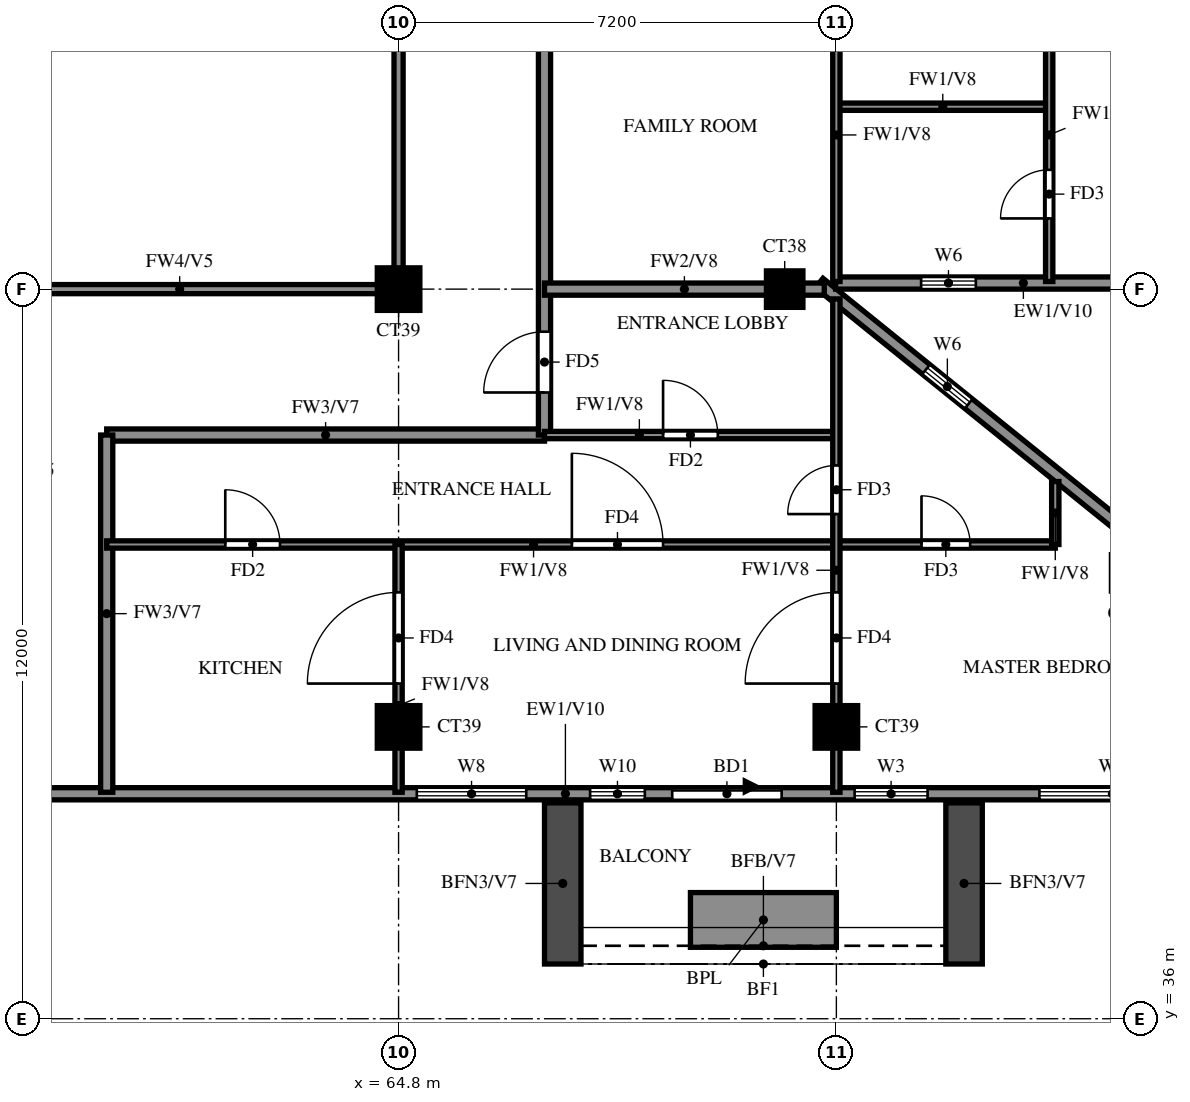
"""IFC4 building model, lengths in metres.
Left out: names, types, materials, properties, quantities, classifications, styles, units other than length and angle.
Written with IfcOpenShell. Run it as: python <this file> out.ifc"""

import sys

from ifc_helpers import new_model, si_unit, direction, frame, frame_2d, origin, origin_2d, place, context, subcontext, project, spatial, rectangle, extrude, source, transform, mapped, element, fill, save


model = new_model("IFC4")
c1 = context("Model", 3, precision=1e-05, world=origin(), true_north=direction((0.0, 1.0)))
c2 = subcontext(c1, "Body", "Model", "MODEL_VIEW")
j1 = project(units=[si_unit("LENGTHUNIT", "METRE"), si_unit("PLANEANGLEUNIT", "RADIAN")], contexts=[c1])
p1 = place(None, origin())
s1 = spatial("IfcSite", under=j1, at=p1, CompositionType="ELEMENT")
p2 = place(p1, origin())
s2 = spatial("IfcBuilding", under=s1, at=p2, CompositionType="ELEMENT")
p3 = place(p2, frame((0.0, 0.0, 267.5)))
s3 = spatial("IfcBuildingStorey", under=s2, at=p3, CompositionType="ELEMENT", Elevation=267.5)
m1 = source(origin(), c2, "Body", "SweptSolid", [
    extrude(rectangle(XDim=0.7, YDim=0.7, at=origin_2d()), origin(), (0.0, 0.0, 1.0), 3.099),
])
for number, where, z_axis, x_axis in (
    (1, (64.8, 40.8, 0.0), (0.0, 0.0, 1.0), (1.0, 0.0, 0.0)),
    (2, (72.0, 40.8, 0.0), (0.0, 0.0, 1.0), (1.0, 0.0, 0.0)),
    (3, (64.8, 48.0, 0.0), (0.0, 0.0, 1.0), (1.0, 0.0, 0.0)),
):
    element("IfcColumn", number, at=place(p3, frame(where, z_axis=z_axis, x_axis=x_axis)), inside=s3, PredefinedType="COLUMN", context=c2, shape_type="MappedRepresentation", body=[
        mapped(m1, transform((0.0, 0.0, 0.0))),
    ])
m2 = source(origin(), c2, "Body", "SweptSolid", [
    extrude(rectangle(XDim=0.6, YDim=0.6, at=origin_2d()), origin(), (0.0, 0.0, 1.0), 3.099),
])
p4 = place(p3, frame((71.15, 48.0, 0.0), z_axis=(0.0, 0.0, 1.0), x_axis=(1.0, 0.0, 0.0)))
e4 = element("IfcColumn", 4, at=p4, inside=s3, PredefinedType="COLUMN", context=c2, shape_type="MappedRepresentation", body=[
    mapped(m2, transform((0.0, 0.0, 0.0))),
])
p5 = place(p3, frame((81.907, 39.87, 0.0), z_axis=(0.0, 0.0, 1.0), x_axis=(-0.777936274417, 0.62834318087, 0.0)))
e5 = element("IfcWall", 5, at=p5, inside=s3, PredefinedType="SOLIDWALL", context=c2, shape_type="SweptSolid", body=[
    extrude(rectangle(XDim=13.099, YDim=0.2, at=frame_2d((6.549, 0.0))), origin(), (0.0, 0.0, 1.0), 3.099),
])
p6 = place(p5, frame((9.938, 0.0, 1.5)))
e6 = element("IfcOpeningElement", 6, at=p6, cuts=e5, PredefinedType="OPENING", context=c2, shape_type="SweptSolid", body=[
    extrude(rectangle(XDim=0.9, YDim=0.9, at=frame_2d((0.45, 0.45))), frame((0.0, 0.11, 0.0), z_axis=(0.0, -1.0, 0.0), x_axis=(1.0, 0.0, 0.0)), (0.0, 0.0, 1.0), 0.22),
])
p7 = place(p3, frame((71.987, 48.1, 0.0), z_axis=(0.0, 0.0, 1.0), x_axis=(1.0, 0.0, 0.0)))
e7 = element("IfcWall", 7, at=p7, inside=s3, PredefinedType="SOLIDWALL", context=c2, shape_type="SweptSolid", body=[
    extrude(rectangle(XDim=6.863, YDim=0.2, at=frame_2d((3.432, 0.0))), origin(), (0.0, 0.0, 1.0), 3.099),
])
p8 = place(p7, frame((1.406, 0.0, 1.5)))
e8 = element("IfcOpeningElement", 8, at=p8, cuts=e7, PredefinedType="OPENING", context=c2, shape_type="SweptSolid", body=[
    extrude(rectangle(XDim=0.9, YDim=0.9, at=frame_2d((0.45, 0.45))), frame((0.0, 0.11, 0.0), z_axis=(0.0, -1.0, 0.0), x_axis=(1.0, 0.0, 0.0)), (0.0, 0.0, 1.0), 0.22),
])
p9 = place(p3, frame((58.8, 39.7, 0.0), z_axis=(0.0, 0.0, 1.0), x_axis=(1.0, 0.0, 0.0)))
e9 = element("IfcWall", 9, at=p9, inside=s3, PredefinedType="SOLIDWALL", context=c2, shape_type="SweptSolid", body=[
    extrude(rectangle(XDim=23.317, YDim=0.2, at=frame_2d((11.658, 0.0))), origin(), (0.0, 0.0, 1.0), 3.099),
])
p10 = place(p9, frame((10.5, 0.0, 0.0)))
e10 = element("IfcOpeningElement", 10, at=p10, cuts=e9, PredefinedType="OPENING", context=c2, shape_type="SweptSolid", body=[
    extrude(rectangle(XDim=1.8, YDim=2.4, at=frame_2d((0.9, 1.2))), frame((0.0, 0.11, 0.0), z_axis=(0.0, -1.0, 0.0), x_axis=(1.0, 0.0, 0.0)), (0.0, 0.0, 1.0), 0.22),
])
p11 = place(p9, frame((6.3, 0.0, 0.6)))
e11 = element("IfcOpeningElement", 11, at=p11, cuts=e9, PredefinedType="OPENING", context=c2, shape_type="SweptSolid", body=[
    extrude(rectangle(XDim=1.8, YDim=2.4, at=frame_2d((0.9, 1.2))), frame((0.0, 0.11, 0.0), z_axis=(0.0, -1.0, 0.0), x_axis=(1.0, 0.0, 0.0)), (0.0, 0.0, 1.0), 0.22),
])
p12 = place(p9, frame((9.15, 0.0, 0.6)))
e12 = element("IfcOpeningElement", 12, at=p12, cuts=e9, PredefinedType="OPENING", context=c2, shape_type="SweptSolid", body=[
    extrude(rectangle(XDim=0.9, YDim=2.4, at=frame_2d((0.45, 1.2))), frame((0.0, 0.11, 0.0), z_axis=(0.0, -1.0, 0.0), x_axis=(1.0, 0.0, 0.0)), (0.0, 0.0, 1.0), 0.22),
])
p13 = place(p9, frame((13.5, 0.0, 0.6)))
e13 = element("IfcOpeningElement", 13, at=p13, cuts=e9, PredefinedType="OPENING", context=c2, shape_type="SweptSolid", body=[
    extrude(rectangle(XDim=1.2, YDim=2.4, at=frame_2d((0.6, 1.2))), frame((0.0, 0.11, 0.0), z_axis=(0.0, -1.0, 0.0), x_axis=(1.0, 0.0, 0.0)), (0.0, 0.0, 1.0), 0.22),
])
p14 = place(p9, frame((16.539, 0.0, 0.6)))
e14 = element("IfcOpeningElement", 14, at=p14, cuts=e9, PredefinedType="OPENING", context=c2, shape_type="SweptSolid", body=[
    extrude(rectangle(XDim=2.4, YDim=2.4, at=frame_2d((1.2, 1.2))), frame((0.0, 0.11, 0.0), z_axis=(0.0, -1.0, 0.0), x_axis=(1.0, 0.0, 0.0)), (0.0, 0.0, 1.0), 0.22),
])
p15 = place(p9, frame((19.778, 0.0, 0.6)))
e15 = element("IfcOpeningElement", 15, at=p15, cuts=e9, PredefinedType="OPENING", context=c2, shape_type="SweptSolid", body=[
    extrude(rectangle(XDim=2.4, YDim=2.4, at=frame_2d((1.2, 1.2))), frame((0.0, 0.11, 0.0), z_axis=(0.0, -1.0, 0.0), x_axis=(1.0, 0.0, 0.0)), (0.0, 0.0, 1.0), 0.22),
])
for number, where, z_axis, x_axis in (
    (16, (67.5, 39.55, 0.0), (0.0, 0.0, 1.0), (0.0, -1.0, 0.0)),
    (17, (74.1, 39.55, 0.0), (0.0, 0.0, 1.0), (0.0, -1.0, 0.0)),
):
    element("IfcWall", number, at=place(p3, frame(where, z_axis=z_axis, x_axis=x_axis)), inside=s3, PredefinedType="SOLIDWALL", context=c2, shape_type="SweptSolid", body=[
        extrude(rectangle(XDim=2.65, YDim=0.6, at=frame_2d((1.325, 0.0))), origin(), (0.0, 0.0, 1.0), 2.729),
    ])
p16 = place(p3, frame((69.6, 37.625, 0.0), z_axis=(0.0, 0.0, 1.0), x_axis=(1.0, 0.0, 0.0)))
e18 = element("IfcWall", 18, at=p16, inside=s3, PredefinedType="SOLIDWALL", context=c2, shape_type="SweptSolid", body=[
    extrude(rectangle(XDim=2.4, YDim=0.9, at=frame_2d((1.2, 0.0))), origin(), (0.0, 0.0, 1.0), 0.9),
])
p17 = place(p3, frame((60.0, 45.6, 0.0), z_axis=(0.0, 0.0, 1.0), x_axis=(1.0, 0.0, 0.0)))
e19 = element("IfcWall", 19, at=p17, inside=s3, PredefinedType="SOLIDWALL", context=c2, shape_type="SweptSolid", body=[
    extrude(rectangle(XDim=7.2, YDim=0.2, at=frame_2d((3.6, 0.0))), origin(), (0.0, 0.0, 1.0), 3.099),
])
p18 = place(p3, frame((60.0, 39.725, 0.0), z_axis=(0.0, 0.0, 1.0), x_axis=(0.0, 1.0, 0.0)))
e20 = element("IfcWall", 20, at=p18, inside=s3, PredefinedType="SOLIDWALL", context=c2, shape_type="SweptSolid", body=[
    extrude(rectangle(XDim=5.875, YDim=0.2, at=frame_2d((2.938, 0.0))), origin(), (0.0, 0.0, 1.0), 3.099),
])
p19 = place(p3, frame((67.2, 45.6, 0.0), z_axis=(0.0, 0.0, 1.0), x_axis=(0.0, 1.0, 0.0)))
e21 = element("IfcWall", 21, at=p19, inside=s3, PredefinedType="SOLIDWALL", context=c2, shape_type="SweptSolid", body=[
    extrude(rectangle(XDim=16.8, YDim=0.2, at=frame_2d((8.4, 0.0))), origin(), (0.0, 0.0, 1.0), 3.099),
])
p20 = place(p19, frame((8.3, 0.0, 0.0)))
e22 = element("IfcOpeningElement", 22, at=p20, cuts=e21, PredefinedType="OPENING", context=c2, shape_type="SweptSolid", body=[
    extrude(rectangle(XDim=1.0, YDim=2.1, at=frame_2d((0.5, 1.05))), frame((0.0, 0.11, 0.0), z_axis=(0.0, -1.0, 0.0), x_axis=(1.0, 0.0, 0.0)), (0.0, 0.0, 1.0), 0.22),
])
p21 = place(p19, frame((15.1, 0.0, 0.0)))
e23 = element("IfcOpeningElement", 23, at=p21, cuts=e21, PredefinedType="OPENING", context=c2, shape_type="SweptSolid", body=[
    extrude(rectangle(XDim=1.0, YDim=2.1, at=frame_2d((0.5, 1.05))), frame((0.0, 0.11, 0.0), z_axis=(0.0, -1.0, 0.0), x_axis=(1.0, 0.0, 0.0)), (0.0, 0.0, 1.0), 0.22),
])
p22 = place(p19, frame((0.7, 0.0, 0.0)))
e24 = element("IfcOpeningElement", 24, at=p22, cuts=e21, PredefinedType="OPENING", context=c2, shape_type="SweptSolid", body=[
    extrude(rectangle(XDim=1.0, YDim=2.1, at=frame_2d((0.5, 1.05))), frame((0.0, 0.11, 0.0), z_axis=(0.0, -1.0, 0.0), x_axis=(1.0, 0.0, 0.0)), (0.0, 0.0, 1.0), 0.22),
])
p23 = place(p3, frame((67.2, 48.0, 0.0), z_axis=(0.0, 0.0, 1.0), x_axis=(1.0, 0.0, 0.0)))
e25 = element("IfcWall", 25, at=p23, inside=s3, PredefinedType="SOLIDWALL", context=c2, shape_type="SweptSolid", body=[
    extrude(rectangle(XDim=4.601, YDim=0.2, at=frame_2d((2.301, 0.0))), origin(), (0.0, 0.0, 1.0), 3.099),
])
p24 = place(p3, frame((60.0, 43.8, 0.0), z_axis=(0.0, 0.0, 1.0), x_axis=(1.0, 0.0, 0.0)))
e26 = element("IfcWall", 26, at=p24, inside=s3, PredefinedType="PARTITIONING", context=c2, shape_type="SweptSolid", body=[
    extrude(rectangle(XDim=15.6, YDim=0.12, at=frame_2d((7.8, 0.0))), origin(), (0.0, 0.0, 1.0), 3.099),
])
p25 = place(p24, frame((7.65, 0.0, 0.0)))
e27 = element("IfcOpeningElement", 27, at=p25, cuts=e26, PredefinedType="OPENING", context=c2, shape_type="SweptSolid", body=[
    extrude(rectangle(XDim=1.5, YDim=2.1, at=frame_2d((0.75, 1.05))), frame((0.0, 0.07, 0.0), z_axis=(0.0, -1.0, 0.0), x_axis=(1.0, 0.0, 0.0)), (0.0, 0.0, 1.0), 0.14),
])
p26 = place(p24, frame((1.95, 0.0, 0.0)))
e28 = element("IfcOpeningElement", 28, at=p26, cuts=e26, PredefinedType="OPENING", context=c2, shape_type="SweptSolid", body=[
    extrude(rectangle(XDim=0.9, YDim=2.1, at=frame_2d((0.45, 1.05))), frame((0.0, 0.07, 0.0), z_axis=(0.0, -1.0, 0.0), x_axis=(1.0, 0.0, 0.0)), (0.0, 0.0, 1.0), 0.14),
])
p27 = place(p24, frame((13.4, 0.0, 0.0)))
e29 = element("IfcOpeningElement", 29, at=p27, cuts=e26, PredefinedType="OPENING", context=c2, shape_type="SweptSolid", body=[
    extrude(rectangle(XDim=0.8, YDim=2.1, at=frame_2d((0.4, 1.05))), frame((0.0, 0.07, 0.0), z_axis=(0.0, -1.0, 0.0), x_axis=(1.0, 0.0, 0.0)), (0.0, 0.0, 1.0), 0.14),
])
p28 = place(p3, frame((67.2, 45.6, 0.0), z_axis=(0.0, 0.0, 1.0), x_axis=(1.0, 0.0, 0.0)))
e30 = element("IfcWall", 30, at=p28, inside=s3, PredefinedType="PARTITIONING", context=c2, shape_type="SweptSolid", body=[
    extrude(rectangle(XDim=4.8, YDim=0.12, at=frame_2d((2.4, 0.0))), origin(), (0.0, 0.0, 1.0), 3.099),
])
p29 = place(p28, frame((1.95, 0.0, 0.0)))
e31 = element("IfcOpeningElement", 31, at=p29, cuts=e30, PredefinedType="OPENING", context=c2, shape_type="SweptSolid", body=[
    extrude(rectangle(XDim=0.9, YDim=2.1, at=frame_2d((0.45, 1.05))), frame((0.0, 0.07, 0.0), z_axis=(0.0, -1.0, 0.0), x_axis=(1.0, 0.0, 0.0)), (0.0, 0.0, 1.0), 0.14),
])
p30 = place(p3, frame((72.0, 51.0, 0.0), z_axis=(0.0, 0.0, 1.0), x_axis=(1.0, 0.0, 0.0)))
e32 = element("IfcWall", 32, at=p30, inside=s3, PredefinedType="PARTITIONING", context=c2, shape_type="SweptSolid", body=[
    extrude(rectangle(XDim=3.5, YDim=0.12, at=frame_2d((1.75, 0.0))), origin(), (0.0, 0.0, 1.0), 3.099),
])
p31 = place(p3, frame((64.8, 39.725, 0.0), z_axis=(0.0, 0.0, 1.0), x_axis=(0.0, 1.0, 0.0)))
e33 = element("IfcWall", 33, at=p31, inside=s3, PredefinedType="PARTITIONING", context=c2, shape_type="SweptSolid", body=[
    extrude(rectangle(XDim=4.075, YDim=0.12, at=frame_2d((2.038, 0.0))), origin(), (0.0, 0.0, 1.0), 3.099),
])
p32 = place(p31, frame((1.788, 0.0, 0.0)))
e34 = element("IfcOpeningElement", 34, at=p32, cuts=e33, PredefinedType="OPENING", context=c2, shape_type="SweptSolid", body=[
    extrude(rectangle(XDim=1.5, YDim=2.1, at=frame_2d((0.75, 1.05))), frame((0.0, 0.07, 0.0), z_axis=(0.0, -1.0, 0.0), x_axis=(1.0, 0.0, 0.0)), (0.0, 0.0, 1.0), 0.14),
])
p33 = place(p3, frame((72.0, 39.725, 0.0), z_axis=(0.0, 0.0, 1.0), x_axis=(0.0, 1.0, 0.0)))
e35 = element("IfcWall", 35, at=p33, inside=s3, PredefinedType="PARTITIONING", context=c2, shape_type="SweptSolid", body=[
    extrude(rectangle(XDim=8.114, YDim=0.12, at=frame_2d((4.057, 0.0))), origin(), (0.0, 0.0, 1.0), 3.099),
])
p34 = place(p33, frame((1.788, 0.0, 0.0)))
e36 = element("IfcOpeningElement", 36, at=p34, cuts=e35, PredefinedType="OPENING", context=c2, shape_type="SweptSolid", body=[
    extrude(rectangle(XDim=1.5, YDim=2.1, at=frame_2d((0.75, 1.05))), frame((0.0, 0.07, 0.0), z_axis=(0.0, -1.0, 0.0), x_axis=(1.0, 0.0, 0.0)), (0.0, 0.0, 1.0), 0.14),
])
p35 = place(p33, frame((4.575, 0.0, 0.0)))
e37 = element("IfcOpeningElement", 37, at=p35, cuts=e35, PredefinedType="OPENING", context=c2, shape_type="SweptSolid", body=[
    extrude(rectangle(XDim=0.8, YDim=2.1, at=frame_2d((0.4, 1.05))), frame((0.0, 0.07, 0.0), z_axis=(0.0, -1.0, 0.0), x_axis=(1.0, 0.0, 0.0)), (0.0, 0.0, 1.0), 0.14),
])
p36 = place(p3, frame((72.0, 48.125, 0.0), z_axis=(0.0, 0.0, 1.0), x_axis=(0.0, 1.0, 0.0)))
e38 = element("IfcWall", 38, at=p36, inside=s3, PredefinedType="PARTITIONING", context=c2, shape_type="SweptSolid", body=[
    extrude(rectangle(XDim=5.075, YDim=0.12, at=frame_2d((2.538, 0.0))), origin(), (0.0, 0.0, 1.0), 3.099),
])
p37 = place(p3, frame((75.5, 48.125, 0.0), z_axis=(0.0, 0.0, 1.0), x_axis=(0.0, 1.0, 0.0)))
e39 = element("IfcWall", 39, at=p37, inside=s3, PredefinedType="PARTITIONING", context=c2, shape_type="SweptSolid", body=[
    extrude(rectangle(XDim=5.075, YDim=0.12, at=frame_2d((2.538, 0.0))), origin(), (0.0, 0.0, 1.0), 3.099),
])
p38 = place(p37, frame((1.038, 0.0, 0.0)))
e40 = element("IfcOpeningElement", 40, at=p38, cuts=e39, PredefinedType="OPENING", context=c2, shape_type="SweptSolid", body=[
    extrude(rectangle(XDim=0.8, YDim=2.1, at=frame_2d((0.4, 1.05))), frame((0.0, 0.07, 0.0), z_axis=(0.0, -1.0, 0.0), x_axis=(1.0, 0.0, 0.0)), (0.0, 0.0, 1.0), 0.14),
])
p39 = place(p3, frame((75.6, 43.8, 0.0), z_axis=(0.0, 0.0, 1.0), x_axis=(0.0, 1.0, 0.0)))
e41 = element("IfcWall", 41, at=p39, inside=s3, PredefinedType="PARTITIONING", context=c2, shape_type="SweptSolid", body=[
    extrude(rectangle(XDim=1.035, YDim=0.12, at=frame_2d((0.518, 0.0))), origin(), (0.0, 0.0, 1.0), 3.099),
])
p40 = place(p3, frame((57.6, 48.0, 0.0), z_axis=(0.0, 0.0, 1.0), x_axis=(1.0, 0.0, 0.0)))
e42 = element("IfcWall", 42, at=p40, inside=s3, PredefinedType="SOLIDWALL", context=c2, shape_type="SweptSolid", body=[
    extrude(rectangle(XDim=7.2, YDim=0.15, at=frame_2d((3.6, 0.0))), origin(), (0.0, 0.0, 1.0), 2.199),
])
p41 = place(p3, frame((64.8, 48.0, 0.0), z_axis=(0.0, 0.0, 1.0), x_axis=(0.0, 1.0, 0.0)))
e43 = element("IfcWall", 43, at=p41, inside=s3, PredefinedType="SOLIDWALL", context=c2, shape_type="SweptSolid", body=[
    extrude(rectangle(XDim=14.4, YDim=0.15, at=frame_2d((7.2, 0.0))), origin(), (0.0, 0.0, 1.0), 2.199),
])
p42 = place(p6, origin())
e44 = element("IfcWindow", 44, at=p42, inside=s3, PartitioningType="SINGLE_PANEL", PredefinedType="WINDOW", context=c2, shape_type="SweptSolid", body=[
    extrude(rectangle(XDim=0.9, YDim=0.9, at=frame_2d((0.45, 0.45))), frame((0.0, 0.03, 0.0), z_axis=(0.0, -1.0, 0.0), x_axis=(1.0, 0.0, 0.0)), (0.0, 0.0, 1.0), 0.06),
])
fill(e6, e44)
p43 = place(p8, origin())
e45 = element("IfcWindow", 45, at=p43, inside=s3, PartitioningType="SINGLE_PANEL", PredefinedType="WINDOW", context=c2, shape_type="SweptSolid", body=[
    extrude(rectangle(XDim=0.9, YDim=0.9, at=frame_2d((0.45, 0.45))), frame((0.0, 0.03, 0.0), z_axis=(0.0, -1.0, 0.0), x_axis=(1.0, 0.0, 0.0)), (0.0, 0.0, 1.0), 0.06),
])
fill(e8, e45)
p44 = place(p10, origin())
e46 = element("IfcDoor", 46, at=p44, inside=s3, OperationType="DOUBLE_DOOR_SLIDING", PredefinedType="DOOR", context=c2, shape_type="SweptSolid", body=[
    extrude(rectangle(XDim=1.8, YDim=2.4, at=frame_2d((0.9, 1.2))), frame((0.0, 0.025, 0.0), z_axis=(0.0, -1.0, 0.0), x_axis=(1.0, 0.0, 0.0)), (0.0, 0.0, 1.0), 0.05),
])
fill(e10, e46)
p45 = place(p11, origin())
e47 = element("IfcWindow", 47, at=p45, inside=s3, PartitioningType="DOUBLE_PANEL_VERTICAL", PredefinedType="WINDOW", context=c2, shape_type="SweptSolid", body=[
    extrude(rectangle(XDim=1.8, YDim=2.4, at=frame_2d((0.9, 1.2))), frame((0.0, 0.03, 0.0), z_axis=(0.0, -1.0, 0.0), x_axis=(1.0, 0.0, 0.0)), (0.0, 0.0, 1.0), 0.06),
])
fill(e11, e47)
p46 = place(p12, origin())
e48 = element("IfcWindow", 48, at=p46, inside=s3, PartitioningType="SINGLE_PANEL", PredefinedType="WINDOW", context=c2, shape_type="SweptSolid", body=[
    extrude(rectangle(XDim=0.9, YDim=2.4, at=frame_2d((0.45, 1.2))), frame((0.0, 0.03, 0.0), z_axis=(0.0, -1.0, 0.0), x_axis=(1.0, 0.0, 0.0)), (0.0, 0.0, 1.0), 0.06),
])
fill(e12, e48)
p47 = place(p13, origin())
e49 = element("IfcWindow", 49, at=p47, inside=s3, PartitioningType="SINGLE_PANEL", PredefinedType="WINDOW", context=c2, shape_type="SweptSolid", body=[
    extrude(rectangle(XDim=1.2, YDim=2.4, at=frame_2d((0.6, 1.2))), frame((0.0, 0.03, 0.0), z_axis=(0.0, -1.0, 0.0), x_axis=(1.0, 0.0, 0.0)), (0.0, 0.0, 1.0), 0.06),
])
fill(e13, e49)
p48 = place(p14, origin())
e50 = element("IfcWindow", 50, at=p48, inside=s3, PartitioningType="DOUBLE_PANEL_VERTICAL", PredefinedType="WINDOW", context=c2, shape_type="SweptSolid", body=[
    extrude(rectangle(XDim=2.4, YDim=2.4, at=frame_2d((1.2, 1.2))), frame((0.0, 0.03, 0.0), z_axis=(0.0, -1.0, 0.0), x_axis=(1.0, 0.0, 0.0)), (0.0, 0.0, 1.0), 0.06),
])
fill(e14, e50)
p49 = place(p38, origin())
e51 = element("IfcDoor", 51, at=p49, inside=s3, OperationType="SINGLE_SWING_LEFT", PredefinedType="DOOR", context=c2, shape_type="SweptSolid", body=[
    extrude(rectangle(XDim=0.8, YDim=2.1, at=frame_2d((0.4, 1.05))), frame((0.0, 0.025, 0.0), z_axis=(0.0, -1.0, 0.0), x_axis=(1.0, 0.0, 0.0)), (0.0, 0.0, 1.0), 0.05),
])
fill(e40, e51)
p50 = place(p32, origin())
e52 = element("IfcDoor", 52, at=p50, inside=s3, OperationType="SINGLE_SWING_RIGHT", PredefinedType="DOOR", context=c2, shape_type="SweptSolid", body=[
    extrude(rectangle(XDim=1.5, YDim=2.1, at=frame_2d((0.75, 1.05))), frame((0.0, 0.025, 0.0), z_axis=(0.0, -1.0, 0.0), x_axis=(1.0, 0.0, 0.0)), (0.0, 0.0, 1.0), 0.05),
])
fill(e34, e52)
p51 = place(p29, origin())
e53 = element("IfcDoor", 53, at=p51, inside=s3, OperationType="SINGLE_SWING_LEFT", PredefinedType="DOOR", context=c2, shape_type="SweptSolid", body=[
    extrude(rectangle(XDim=0.9, YDim=2.1, at=frame_2d((0.45, 1.05))), frame((0.0, 0.025, 0.0), z_axis=(0.0, -1.0, 0.0), x_axis=(1.0, 0.0, 0.0)), (0.0, 0.0, 1.0), 0.05),
])
fill(e31, e53)
p52 = place(p22, origin())
e54 = element("IfcDoor", 54, at=p52, inside=s3, OperationType="SINGLE_SWING_RIGHT", PredefinedType="DOOR", context=c2, shape_type="SweptSolid", body=[
    extrude(rectangle(XDim=1.0, YDim=2.1, at=frame_2d((0.5, 1.05))), frame((0.0, 0.025, 0.0), z_axis=(0.0, -1.0, 0.0), x_axis=(1.0, 0.0, 0.0)), (0.0, 0.0, 1.0), 0.05),
])
fill(e24, e54)
p53 = place(p25, origin())
e55 = element("IfcDoor", 55, at=p53, inside=s3, OperationType="SINGLE_SWING_LEFT", PredefinedType="DOOR", context=c2, shape_type="SweptSolid", body=[
    extrude(rectangle(XDim=1.5, YDim=2.1, at=frame_2d((0.75, 1.05))), frame((0.0, 0.025, 0.0), z_axis=(0.0, -1.0, 0.0), x_axis=(1.0, 0.0, 0.0)), (0.0, 0.0, 1.0), 0.05),
])
fill(e27, e55)
p54 = place(p26, origin())
e56 = element("IfcDoor", 56, at=p54, inside=s3, OperationType="SINGLE_SWING_LEFT", PredefinedType="DOOR", context=c2, shape_type="SweptSolid", body=[
    extrude(rectangle(XDim=0.9, YDim=2.1, at=frame_2d((0.45, 1.05))), frame((0.0, 0.025, 0.0), z_axis=(0.0, -1.0, 0.0), x_axis=(1.0, 0.0, 0.0)), (0.0, 0.0, 1.0), 0.05),
])
fill(e28, e56)
p55 = place(p34, origin())
e57 = element("IfcDoor", 57, at=p55, inside=s3, OperationType="SINGLE_SWING_LEFT", PredefinedType="DOOR", context=c2, shape_type="SweptSolid", body=[
    extrude(rectangle(XDim=1.5, YDim=2.1, at=frame_2d((0.75, 1.05))), frame((0.0, 0.025, 0.0), z_axis=(0.0, -1.0, 0.0), x_axis=(1.0, 0.0, 0.0)), (0.0, 0.0, 1.0), 0.05),
])
fill(e36, e57)
p56 = place(p35, origin())
e58 = element("IfcDoor", 58, at=p56, inside=s3, OperationType="SINGLE_SWING_LEFT", PredefinedType="DOOR", context=c2, shape_type="SweptSolid", body=[
    extrude(rectangle(XDim=0.8, YDim=2.1, at=frame_2d((0.4, 1.05))), frame((0.0, 0.025, 0.0), z_axis=(0.0, -1.0, 0.0), x_axis=(1.0, 0.0, 0.0)), (0.0, 0.0, 1.0), 0.05),
])
fill(e37, e58)
p57 = place(p27, origin())
e59 = element("IfcDoor", 59, at=p57, inside=s3, OperationType="SINGLE_SWING_LEFT", PredefinedType="DOOR", context=c2, shape_type="SweptSolid", body=[
    extrude(rectangle(XDim=0.8, YDim=2.1, at=frame_2d((0.4, 1.05))), frame((0.0, 0.025, 0.0), z_axis=(0.0, -1.0, 0.0), x_axis=(1.0, 0.0, 0.0)), (0.0, 0.0, 1.0), 0.05),
])
fill(e29, e59)
save(model, sys.argv[1])
